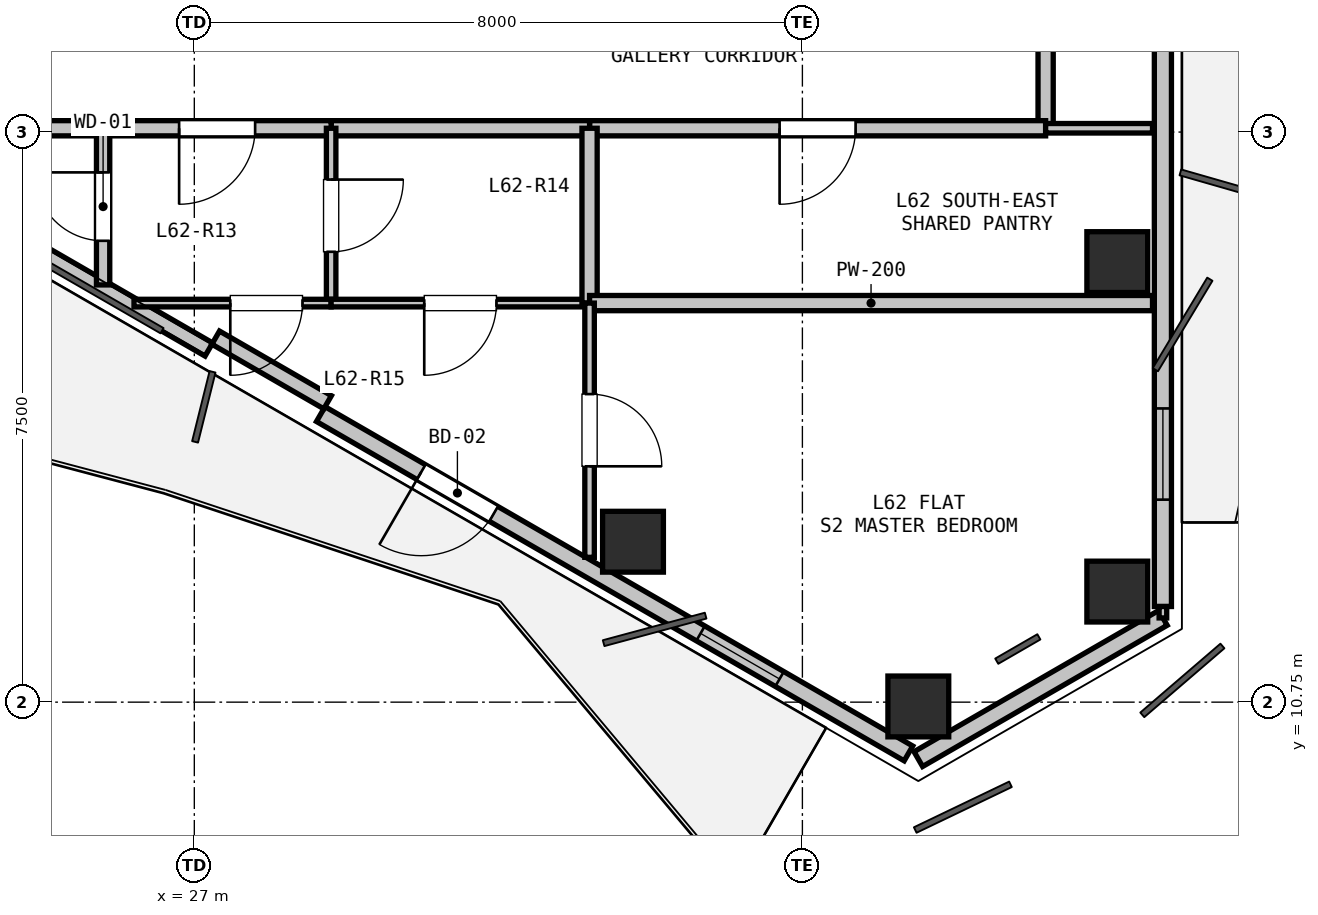
"""IFC4 building model, lengths in metres.
Left out: names, types, materials, properties, quantities, classifications, styles, units other than length and angle.
Written with IfcOpenShell. Run it as: python <this file> out.ifc"""

import sys

from ifc_helpers import new_model, si_unit, direction, frame, frame_2d, origin, origin_2d, place, context, subcontext, project, spatial, rectangle, hollow_rectangle, extrude, element, fill, save


model = new_model("IFC4")
c1 = context("Model", 3, precision=1e-05, world=origin(), true_north=direction((0.0, 1.0)))
c2 = subcontext(c1, "Body", "Model", "MODEL_VIEW")
j1 = project(units=[si_unit("LENGTHUNIT", "METRE"), si_unit("PLANEANGLEUNIT", "RADIAN")], contexts=[c1])
p1 = place(None, origin())
s1 = spatial("IfcSite", under=j1, at=p1, CompositionType="ELEMENT")
p2 = place(p1, origin())
s2 = spatial("IfcBuilding", under=s1, at=p2, CompositionType="ELEMENT")
p3 = place(p2, frame((0.0, 0.0, 223.2)))
s3 = spatial("IfcBuildingStorey", under=s2, at=p3, CompositionType="ELEMENT", Elevation=223.2)
for number, where, z_axis, x_axis in (
    (1, (39.143, 16.539, -0.22), (0.0, 0.0, 1.0), (1.0, 0.0, 0.0)),
    (2, (39.143, 12.205, -0.22), (0.0, 0.0, 1.0), (1.0, 0.0, 0.0)),
    (3, (36.525, 10.693, -0.22), (0.0, 0.0, 1.0), (1.0, 0.0, 0.0)),
    (4, (32.771, 12.861, -0.22), (0.0, 0.0, 1.0), (1.0, 0.0, 0.0)),
):
    element("IfcColumn", number, at=place(p3, frame(where, z_axis=z_axis, x_axis=x_axis)), inside=s3, PredefinedType="COLUMN", context=c2, shape_type="SweptSolid", body=[
        extrude(hollow_rectangle(XDim=0.8, YDim=0.8, WallThickness=0.025, at=origin_2d()), origin(), (0.0, 0.0, 1.0), 3.52),
    ])
p4 = place(p3, frame((39.743, 11.858, 0.0), z_axis=(0.0, 0.0, 1.0), x_axis=(-0.866038962515, -0.499976514854, 0.0)))
e5 = element("IfcWall", 5, at=p4, inside=s3, PredefinedType="SOLIDWALL", context=c2, shape_type="SweptSolid", body=[
    extrude(rectangle(XDim=3.716, YDim=0.225, at=frame_2d((1.858, 0.0))), origin(), (0.0, 0.0, 1.0), 2.7),
])
p5 = place(p3, frame((39.743, 20.936, 0.0), z_axis=(0.0, 0.0, 1.0), x_axis=(0.0, -1.0, 0.0)))
e6 = element("IfcWall", 6, at=p5, inside=s3, PredefinedType="SOLIDWALL", context=c2, shape_type="SweptSolid", body=[
    extrude(rectangle(XDim=8.928, YDim=0.225, at=frame_2d((4.464, 0.0))), origin(), (0.0, 0.0, 1.0), 2.7),
])
p6 = place(p5, frame((6.322, 0.0, 0.9)))
e7 = element("IfcOpeningElement", 7, at=p6, cuts=e6, PredefinedType="OPENING", context=c2, shape_type="SweptSolid", body=[
    extrude(rectangle(XDim=1.2, YDim=1.4, at=frame_2d((0.6, 0.7))), frame((0.0, 0.123, 0.0), z_axis=(0.0, -1.0, 0.0), x_axis=(1.0, 0.0, 0.0)), (0.0, 0.0, 1.0), 0.245),
])
p7 = place(p3, frame((36.395, 10.076, 0.0), z_axis=(0.0, 0.0, 1.0), x_axis=(-0.866026655105, 0.499997832642, 0.0)))
e8 = element("IfcWall", 8, at=p7, inside=s3, PredefinedType="SOLIDWALL", context=c2, shape_type="SweptSolid", body=[
    extrude(rectangle(XDim=8.928, YDim=0.225, at=frame_2d((4.464, 0.0))), origin(), (0.0, 0.0, 1.0), 2.7),
])
p8 = place(p7, frame((6.302, 0.0, 0.0)))
e9 = element("IfcOpeningElement", 9, at=p8, cuts=e8, PredefinedType="OPENING", context=c2, shape_type="SweptSolid", body=[
    extrude(rectangle(XDim=1.1, YDim=2.1, at=frame_2d((0.55, 1.05))), frame((0.0, 0.123, 0.0), z_axis=(0.0, -1.0, 0.0), x_axis=(1.0, 0.0, 0.0)), (0.0, 0.0, 1.0), 0.245),
])
p9 = place(p7, frame((1.958, 0.0, 0.9)))
e10 = element("IfcOpeningElement", 10, at=p9, cuts=e8, PredefinedType="OPENING", context=c2, shape_type="SweptSolid", body=[
    extrude(rectangle(XDim=1.2, YDim=1.4, at=frame_2d((0.6, 0.7))), frame((0.0, 0.123, 0.0), z_axis=(0.0, -1.0, 0.0), x_axis=(1.0, 0.0, 0.0)), (0.0, 0.0, 1.0), 0.245),
])
p10 = place(p3, frame((27.191, 15.389, 0.0), z_axis=(0.0, 0.0, 1.0), x_axis=(-0.866019557082, 0.500010126649, 0.0)))
e11 = element("IfcWall", 11, at=p10, inside=s3, PredefinedType="PARAPET", context=c2, shape_type="SweptSolid", body=[
    extrude(rectangle(XDim=8.228, YDim=0.2, at=frame_2d((4.114, 0.0))), origin(), (0.0, 0.0, 1.0), 0.2),
])
p11 = place(p3, frame((28.754, 14.695, 0.0), z_axis=(0.0, 0.0, 1.0), x_axis=(-0.866025371046, 0.500000056704, 0.0)))
e12 = element("IfcWall", 12, at=p11, inside=s3, PredefinedType="PARAPET", context=c2, shape_type="SweptSolid", body=[
    extrude(rectangle(XDim=1.7, YDim=0.2, at=frame_2d((0.85, 0.0))), origin(), (0.0, 0.0, 1.0), 2.7),
])
p12 = place(p3, frame((38.2, 20.75, 0.0), z_axis=(0.0, 0.0, 1.0), x_axis=(0.0, -1.0, 0.0)))
e13 = element("IfcWall", 13, at=p12, inside=s3, PredefinedType="PARTITIONING", context=c2, shape_type="SweptSolid", body=[
    extrude(rectangle(XDim=2.45, YDim=0.2, at=frame_2d((1.225, 0.0))), origin(), (0.0, 0.0, 1.0), 3.08),
])
p13 = place(p3, frame((38.2, 18.3, 0.0), z_axis=(0.0, 0.0, 1.0), x_axis=(-1.0, 0.0, 0.0)))
e14 = element("IfcWall", 14, at=p13, inside=s3, PredefinedType="PARTITIONING", context=c2, shape_type="SweptSolid", body=[
    extrude(rectangle(XDim=6.0, YDim=0.2, at=frame_2d((3.0, 0.0))), origin(), (0.0, 0.0, 1.0), 2.528),
])
p14 = place(p13, frame((2.5, 0.0, 0.0)))
e15 = element("IfcOpeningElement", 15, at=p14, cuts=e14, PredefinedType="OPENING", context=c2, shape_type="SweptSolid", body=[
    extrude(rectangle(XDim=1.0, YDim=2.15, at=frame_2d((0.5, 1.075))), frame((0.0, 0.11, 0.0), z_axis=(0.0, -1.0, 0.0), x_axis=(1.0, 0.0, 0.0)), (0.0, 0.0, 1.0), 0.22),
])
p15 = place(p3, frame((32.2, 18.3, 0.0), z_axis=(0.0, 0.0, 1.0), x_axis=(-1.0, 0.0, 0.0)))
e16 = element("IfcWall", 16, at=p15, inside=s3, PredefinedType="PARTITIONING", context=c2, shape_type="SweptSolid", body=[
    extrude(rectangle(XDim=3.4, YDim=0.2, at=frame_2d((1.7, 0.0))), origin(), (0.0, 0.0, 1.0), 3.08),
])
p16 = place(p3, frame((28.8, 18.3, 0.0), z_axis=(0.0, 0.0, 1.0), x_axis=(-1.0, 0.0, 0.0)))
e17 = element("IfcWall", 17, at=p16, inside=s3, PredefinedType="PARTITIONING", context=c2, shape_type="SweptSolid", body=[
    extrude(rectangle(XDim=3.0, YDim=0.2, at=frame_2d((1.5, 0.0))), origin(), (0.0, 0.0, 1.0), 3.08),
])
p17 = place(p16, frame((1.0, 0.0, 0.0)))
e18 = element("IfcOpeningElement", 18, at=p17, cuts=e17, PredefinedType="OPENING", context=c2, shape_type="SweptSolid", body=[
    extrude(rectangle(XDim=1.0, YDim=2.15, at=frame_2d((0.5, 1.075))), frame((0.0, 0.11, 0.0), z_axis=(0.0, -1.0, 0.0), x_axis=(1.0, 0.0, 0.0)), (0.0, 0.0, 1.0), 0.22),
])
p18 = place(p3, frame((25.8, 18.3, 0.0), z_axis=(0.0, 0.0, 1.0), x_axis=(-1.0, 0.0, 0.0)))
e19 = element("IfcWall", 19, at=p18, inside=s3, PredefinedType="PARTITIONING", context=c2, shape_type="SweptSolid", body=[
    extrude(rectangle(XDim=2.2, YDim=0.2, at=frame_2d((1.1, 0.0))), origin(), (0.0, 0.0, 1.0), 2.365),
])
p19 = place(p3, frame((28.8, 18.3, 0.0), z_axis=(0.0, 0.0, 1.0), x_axis=(0.0, -1.0, 0.0)))
e20 = element("IfcWall", 20, at=p19, inside=s3, PredefinedType="PARTITIONING", context=c2, shape_type="SweptSolid", body=[
    extrude(rectangle(XDim=2.3, YDim=0.125, at=frame_2d((1.15, 0.0))), origin(), (0.0, 0.0, 1.0), 3.08),
])
p20 = place(p19, frame((0.675, 0.0, 0.0)))
e21 = element("IfcOpeningElement", 21, at=p20, cuts=e20, PredefinedType="OPENING", context=c2, shape_type="SweptSolid", body=[
    extrude(rectangle(XDim=0.95, YDim=2.1, at=frame_2d((0.475, 1.05))), frame((0.0, 0.073, 0.0), z_axis=(0.0, -1.0, 0.0), x_axis=(1.0, 0.0, 0.0)), (0.0, 0.0, 1.0), 0.145),
])
p21 = place(p3, frame((28.8, 16.0, 0.0), z_axis=(0.0, 0.0, 1.0), x_axis=(-1.0, 0.0, 0.0)))
e22 = element("IfcWall", 22, at=p21, inside=s3, PredefinedType="PARTITIONING", context=c2, shape_type="SweptSolid", body=[
    extrude(rectangle(XDim=2.594, YDim=0.1, at=frame_2d((1.297, 0.0))), origin(), (0.0, 0.0, 1.0), 2.365),
])
p22 = place(p21, frame((0.377, 0.0, 0.0)))
e23 = element("IfcOpeningElement", 23, at=p22, cuts=e22, PredefinedType="OPENING", context=c2, shape_type="SweptSolid", body=[
    extrude(rectangle(XDim=0.95, YDim=2.1, at=frame_2d((0.475, 1.05))), frame((0.0, 0.06, 0.0), z_axis=(0.0, -1.0, 0.0), x_axis=(1.0, 0.0, 0.0)), (0.0, 0.0, 1.0), 0.12),
])
p23 = place(p3, frame((25.8, 16.239, 0.0), z_axis=(0.0, 0.0, 1.0), x_axis=(0.0, 1.0, 0.0)))
e24 = element("IfcWall", 24, at=p23, inside=s3, PredefinedType="PLUMBINGWALL", context=c2, shape_type="SweptSolid", body=[
    extrude(rectangle(XDim=2.061, YDim=0.175, at=frame_2d((1.031, 0.0))), origin(), (0.0, 0.0, 1.0), 2.365),
])
p24 = place(p23, frame((0.581, 0.0, 0.0)))
e25 = element("IfcOpeningElement", 25, at=p24, cuts=e24, PredefinedType="OPENING", context=c2, shape_type="SweptSolid", body=[
    extrude(rectangle(XDim=0.9, YDim=2.1, at=frame_2d((0.45, 1.05))), frame((0.0, 0.097, 0.0), z_axis=(0.0, -1.0, 0.0), x_axis=(1.0, 0.0, 0.0)), (0.0, 0.0, 1.0), 0.195),
])
p25 = place(p3, frame((32.2, 16.0, 0.0), z_axis=(0.0, 0.0, 1.0), x_axis=(-1.0, 0.0, 0.0)))
e26 = element("IfcWall", 26, at=p25, inside=s3, PredefinedType="PARTITIONING", context=c2, shape_type="SweptSolid", body=[
    extrude(rectangle(XDim=3.4, YDim=0.1, at=frame_2d((1.7, 0.0))), origin(), (0.0, 0.0, 1.0), 3.08),
])
p26 = place(p25, frame((1.225, 0.0, 0.0)))
e27 = element("IfcOpeningElement", 27, at=p26, cuts=e26, PredefinedType="OPENING", context=c2, shape_type="SweptSolid", body=[
    extrude(rectangle(XDim=0.95, YDim=2.1, at=frame_2d((0.475, 1.05))), frame((0.0, 0.06, 0.0), z_axis=(0.0, -1.0, 0.0), x_axis=(1.0, 0.0, 0.0)), (0.0, 0.0, 1.0), 0.12),
])
p27 = place(p3, frame((32.2, 18.3, 0.0), z_axis=(0.0, 0.0, 1.0), x_axis=(0.0, -1.0, 0.0)))
e28 = element("IfcWall", 28, at=p27, inside=s3, PredefinedType="PARTITIONING", context=c2, shape_type="SweptSolid", body=[
    extrude(rectangle(XDim=2.3, YDim=0.2, at=frame_2d((1.15, 0.0))), origin(), (0.0, 0.0, 1.0), 3.08),
])
p28 = place(p3, frame((38.2, 18.3, 0.0), z_axis=(0.0, 0.0, 1.0), x_axis=(1.0, 0.0, 0.0)))
e29 = element("IfcWall", 29, at=p28, inside=s3, PredefinedType="PARTITIONING", context=c2, shape_type="SweptSolid", body=[
    extrude(rectangle(XDim=1.406, YDim=0.125, at=frame_2d((0.703, 0.0))), origin(), (0.0, 0.0, 1.0), 2.365),
])
p29 = place(p3, frame((39.606, 16.0, 0.0), z_axis=(0.0, 0.0, 1.0), x_axis=(-1.0, 0.0, 0.0)))
e30 = element("IfcWall", 30, at=p29, inside=s3, PredefinedType="PARTITIONING", context=c2, shape_type="SweptSolid", body=[
    extrude(rectangle(XDim=7.406, YDim=0.2, at=frame_2d((3.703, 0.0))), origin(), (0.0, 0.0, 1.0), 2.528),
])
p30 = place(p3, frame((32.2, 16.0, 0.0), z_axis=(0.0, 0.0, 1.0), x_axis=(0.0, -1.0, 0.0)))
e31 = element("IfcWall", 31, at=p30, inside=s3, PredefinedType="PARTITIONING", context=c2, shape_type="SweptSolid", body=[
    extrude(rectangle(XDim=3.344, YDim=0.125, at=frame_2d((1.672, 0.0))), origin(), (0.0, 0.0, 1.0), 2.365),
])
p31 = place(p30, frame((1.197, 0.0, 0.0)))
e32 = element("IfcOpeningElement", 32, at=p31, cuts=e31, PredefinedType="OPENING", context=c2, shape_type="SweptSolid", body=[
    extrude(rectangle(XDim=0.95, YDim=2.1, at=frame_2d((0.475, 1.05))), frame((0.0, 0.073, 0.0), z_axis=(0.0, -1.0, 0.0), x_axis=(1.0, 0.0, 0.0)), (0.0, 0.0, 1.0), 0.145),
])
p32 = place(p3, frame((39.743, 12.008, 0.0), z_axis=(0.0, 0.0, 1.0), x_axis=(0.0, -1.0, 0.0)))
e33 = element("IfcWall", 33, at=p32, inside=s3, PredefinedType="PARTITIONING", context=c2, shape_type="SweptSolid", body=[
    extrude(rectangle(XDim=0.15, YDim=0.1, at=frame_2d((0.075, 0.0))), origin(), (0.0, 0.0, 1.0), 3.08),
])
p33 = place(p6, origin())
e34 = element("IfcWindow", 34, at=p33, inside=s3, PartitioningType="SINGLE_PANEL", PredefinedType="WINDOW", context=c2, shape_type="SweptSolid", body=[
    extrude(rectangle(XDim=1.2, YDim=1.4, at=frame_2d((0.6, 0.7))), frame((0.0, 0.03, 0.0), z_axis=(0.0, -1.0, 0.0), x_axis=(1.0, 0.0, 0.0)), (0.0, 0.0, 1.0), 0.06),
])
fill(e7, e34)
p34 = place(p8, origin())
e35 = element("IfcDoor", 35, at=p34, inside=s3, OperationType="SINGLE_SWING_RIGHT", PredefinedType="DOOR", context=c2, shape_type="SweptSolid", body=[
    extrude(rectangle(XDim=1.1, YDim=2.1, at=frame_2d((0.55, 1.05))), frame((0.0, 0.025, 0.0), z_axis=(0.0, -1.0, 0.0), x_axis=(1.0, 0.0, 0.0)), (0.0, 0.0, 1.0), 0.05),
])
fill(e9, e35)
p35 = place(p9, origin())
e36 = element("IfcWindow", 36, at=p35, inside=s3, PartitioningType="SINGLE_PANEL", PredefinedType="WINDOW", context=c2, shape_type="SweptSolid", body=[
    extrude(rectangle(XDim=1.2, YDim=1.4, at=frame_2d((0.6, 0.7))), frame((0.0, 0.03, 0.0), z_axis=(0.0, -1.0, 0.0), x_axis=(1.0, 0.0, 0.0)), (0.0, 0.0, 1.0), 0.06),
])
fill(e10, e36)
p36 = place(p17, origin())
e37 = element("IfcDoor", 37, at=p36, inside=s3, OperationType="SINGLE_SWING_RIGHT", PredefinedType="DOOR", context=c2, shape_type="SweptSolid", body=[
    extrude(rectangle(XDim=1.0, YDim=2.15, at=frame_2d((0.5, 1.075))), frame((0.0, 0.025, 0.0), z_axis=(0.0, -1.0, 0.0), x_axis=(1.0, 0.0, 0.0)), (0.0, 0.0, 1.0), 0.05),
])
fill(e18, e37)
p37 = place(p14, origin())
e38 = element("IfcDoor", 38, at=p37, inside=s3, OperationType="SINGLE_SWING_RIGHT", PredefinedType="DOOR", context=c2, shape_type="SweptSolid", body=[
    extrude(rectangle(XDim=1.0, YDim=2.15, at=frame_2d((0.5, 1.075))), frame((0.0, 0.025, 0.0), z_axis=(0.0, -1.0, 0.0), x_axis=(1.0, 0.0, 0.0)), (0.0, 0.0, 1.0), 0.05),
])
fill(e15, e38)
p38 = place(p24, origin())
e39 = element("IfcDoor", 39, at=p38, inside=s3, OperationType="SINGLE_SWING_RIGHT", PredefinedType="DOOR", context=c2, shape_type="SweptSolid", body=[
    extrude(rectangle(XDim=0.9, YDim=2.1, at=frame_2d((0.45, 1.05))), frame((0.0, 0.025, 0.0), z_axis=(0.0, -1.0, 0.0), x_axis=(1.0, 0.0, 0.0)), (0.0, 0.0, 1.0), 0.05),
])
fill(e25, e39)
p39 = place(p20, origin())
e40 = element("IfcDoor", 40, at=p39, inside=s3, OperationType="SINGLE_SWING_LEFT", PredefinedType="DOOR", context=c2, shape_type="SweptSolid", body=[
    extrude(rectangle(XDim=0.95, YDim=2.1, at=frame_2d((0.475, 1.05))), frame((0.0, 0.025, 0.0), z_axis=(0.0, -1.0, 0.0), x_axis=(1.0, 0.0, 0.0)), (0.0, 0.0, 1.0), 0.05),
])
fill(e21, e40)
p40 = place(p22, origin())
e41 = element("IfcDoor", 41, at=p40, inside=s3, OperationType="SINGLE_SWING_RIGHT", PredefinedType="DOOR", context=c2, shape_type="SweptSolid", body=[
    extrude(rectangle(XDim=0.95, YDim=2.1, at=frame_2d((0.475, 1.05))), frame((0.0, 0.025, 0.0), z_axis=(0.0, -1.0, 0.0), x_axis=(1.0, 0.0, 0.0)), (0.0, 0.0, 1.0), 0.05),
])
fill(e23, e41)
p41 = place(p26, origin())
e42 = element("IfcDoor", 42, at=p41, inside=s3, OperationType="SINGLE_SWING_RIGHT", PredefinedType="DOOR", context=c2, shape_type="SweptSolid", body=[
    extrude(rectangle(XDim=0.95, YDim=2.1, at=frame_2d((0.475, 1.05))), frame((0.0, 0.025, 0.0), z_axis=(0.0, -1.0, 0.0), x_axis=(1.0, 0.0, 0.0)), (0.0, 0.0, 1.0), 0.05),
])
fill(e27, e42)
p42 = place(p31, origin())
e43 = element("IfcDoor", 43, at=p42, inside=s3, OperationType="SINGLE_SWING_RIGHT", PredefinedType="DOOR", context=c2, shape_type="SweptSolid", body=[
    extrude(rectangle(XDim=0.95, YDim=2.1, at=frame_2d((0.475, 1.05))), frame((0.0, 0.025, 0.0), z_axis=(0.0, -1.0, 0.0), x_axis=(1.0, 0.0, 0.0)), (0.0, 0.0, 1.0), 0.05),
])
fill(e32, e43)
save(model, sys.argv[1])
